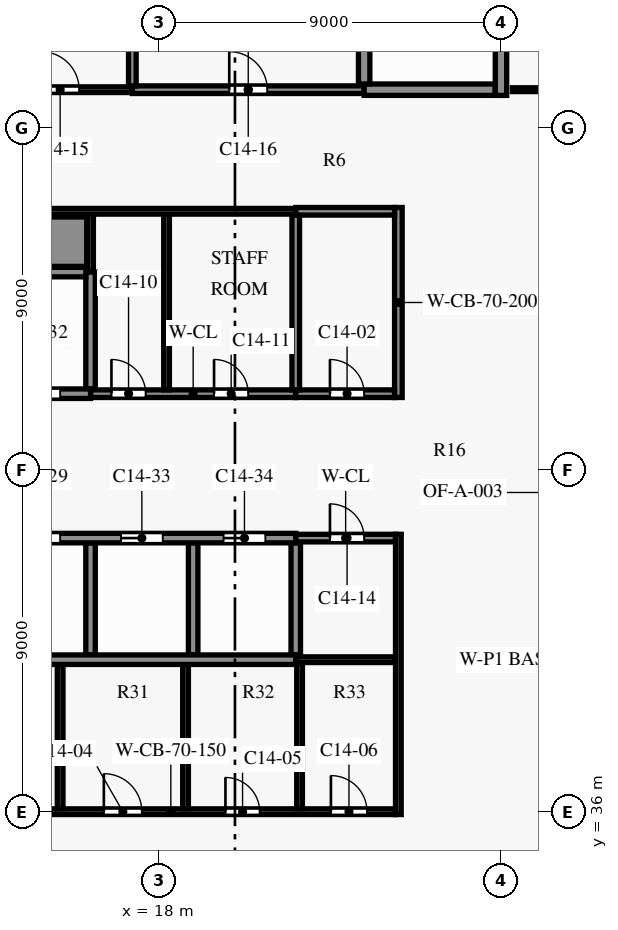
"""IFC4 building model, lengths in metres.
Left out: names, types, materials, properties, quantities, classifications, styles, units other than length and angle.
Written with IfcOpenShell. Run it as: python <this file> out.ifc"""

import sys

from ifc_helpers import new_model, si_unit, direction, frame, frame_2d, origin, place, context, subcontext, project, spatial, rectangle, extrude, element, fill, save


model = new_model("IFC4")
c1 = context("Model", 3, precision=1e-05, world=origin(), true_north=direction((0.0, 1.0)))
c2 = subcontext(c1, "Body", "Model", "MODEL_VIEW")
j1 = project(units=[si_unit("LENGTHUNIT", "METRE"), si_unit("PLANEANGLEUNIT", "RADIAN")], contexts=[c1])
p1 = place(None, origin())
s1 = spatial("IfcSite", under=j1, at=p1, CompositionType="ELEMENT")
p2 = place(p1, origin())
s2 = spatial("IfcBuilding", under=s1, at=p2, CompositionType="ELEMENT")
p3 = place(p2, frame((0.0, 0.0, 88.5)))
s3 = spatial("IfcBuildingStorey", under=s2, at=p3, CompositionType="ELEMENT", Elevation=88.5)
p4 = place(p3, frame((12.4, 36.0, 0.0), z_axis=(0.0, 0.0, 1.0), x_axis=(1.0, 0.0, 0.0)))
e1 = element("IfcWall", 1, at=p4, inside=s3, PredefinedType="SHEAR", context=c2, shape_type="SweptSolid", body=[
    extrude(rectangle(XDim=11.825, YDim=0.15, at=frame_2d((5.913, 0.0))), origin(), (0.0, 0.0, 1.0), 3.5),
])
p5 = place(p4, frame((1.05, 0.0, 0.0)))
e2 = element("IfcOpeningElement", 2, at=p5, cuts=e1, PredefinedType="OPENING", context=c2, shape_type="SweptSolid", body=[
    extrude(rectangle(XDim=0.9, YDim=2.1, at=frame_2d((0.45, 1.05))), frame((0.0, 0.085, 0.0), z_axis=(0.0, -1.0, 0.0), x_axis=(1.0, 0.0, 0.0)), (0.0, 0.0, 1.0), 0.17),
])
p6 = place(p4, frame((4.15, 0.0, 0.0)))
e3 = element("IfcOpeningElement", 3, at=p6, cuts=e1, PredefinedType="OPENING", context=c2, shape_type="SweptSolid", body=[
    extrude(rectangle(XDim=1.0, YDim=2.1, at=frame_2d((0.5, 1.05))), frame((0.0, 0.085, 0.0), z_axis=(0.0, -1.0, 0.0), x_axis=(1.0, 0.0, 0.0)), (0.0, 0.0, 1.0), 0.17),
])
p7 = place(p4, frame((7.35, 0.0, 0.0)))
e4 = element("IfcOpeningElement", 4, at=p7, cuts=e1, PredefinedType="OPENING", context=c2, shape_type="SweptSolid", body=[
    extrude(rectangle(XDim=0.9, YDim=2.1, at=frame_2d((0.45, 1.05))), frame((0.0, 0.085, 0.0), z_axis=(0.0, -1.0, 0.0), x_axis=(1.0, 0.0, 0.0)), (0.0, 0.0, 1.0), 0.17),
])
p8 = place(p4, frame((10.125, 0.0, 0.0)))
e5 = element("IfcOpeningElement", 5, at=p8, cuts=e1, PredefinedType="OPENING", context=c2, shape_type="SweptSolid", body=[
    extrude(rectangle(XDim=0.95, YDim=2.1, at=frame_2d((0.475, 1.05))), frame((0.0, 0.085, 0.0), z_axis=(0.0, -1.0, 0.0), x_axis=(1.0, 0.0, 0.0)), (0.0, 0.0, 1.0), 0.17),
])
p9 = place(p3, frame((21.6, 40.0, 0.0), z_axis=(0.0, 0.0, 1.0), x_axis=(1.0, 0.0, 0.0)))
e6 = element("IfcWall", 6, at=p9, inside=s3, PredefinedType="PARTITIONING", context=c2, shape_type="SweptSolid", body=[
    extrude(rectangle(XDim=2.625, YDim=0.15, at=frame_2d((1.312, 0.0))), origin(), (0.0, 0.0, 1.0), 3.5),
])
p10 = place(p3, frame((8.1, 40.0, 0.0), z_axis=(0.0, 0.0, 1.0), x_axis=(1.0, 0.0, 0.0)))
e7 = element("IfcWall", 7, at=p10, inside=s3, PredefinedType="SHEAR", context=c2, shape_type="SweptSolid", body=[
    extrude(rectangle(XDim=13.5, YDim=0.25, at=frame_2d((6.75, 0.0))), origin(), (0.0, 0.0, 1.0), 3.5),
])
p11 = place(p3, frame((21.6, 43.2, 0.0), z_axis=(0.0, 0.0, 1.0), x_axis=(1.0, 0.0, 0.0)))
e8 = element("IfcWall", 8, at=p11, inside=s3, PredefinedType="PARTITIONING", context=c2, shape_type="SweptSolid", body=[
    extrude(rectangle(XDim=2.625, YDim=0.2, at=frame_2d((1.312, 0.0))), origin(), (0.0, 0.0, 1.0), 3.5),
])
p12 = place(p11, frame((0.9, 0.0, 0.0)))
e9 = element("IfcOpeningElement", 9, at=p12, cuts=e8, PredefinedType="OPENING", context=c2, shape_type="SweptSolid", body=[
    extrude(rectangle(XDim=0.9, YDim=2.1, at=frame_2d((0.45, 1.05))), frame((0.0, 0.11, 0.0), z_axis=(0.0, -1.0, 0.0), x_axis=(1.0, 0.0, 0.0)), (0.0, 0.0, 1.0), 0.22),
])
p13 = place(p3, frame((8.1, 43.2, 0.0), z_axis=(0.0, 0.0, 1.0), x_axis=(1.0, 0.0, 0.0)))
e10 = element("IfcWall", 10, at=p13, inside=s3, PredefinedType="SHEAR", context=c2, shape_type="SweptSolid", body=[
    extrude(rectangle(XDim=13.5, YDim=0.25, at=frame_2d((6.75, 0.0))), origin(), (0.0, 0.0, 1.0), 3.5),
])
p14 = place(p13, frame((0.8, 0.0, 0.0)))
e11 = element("IfcOpeningElement", 11, at=p14, cuts=e10, PredefinedType="OPENING", context=c2, shape_type="SweptSolid", body=[
    extrude(rectangle(XDim=1.1, YDim=2.1, at=frame_2d((0.55, 1.05))), frame((0.0, 0.135, 0.0), z_axis=(0.0, -1.0, 0.0), x_axis=(1.0, 0.0, 0.0)), (0.0, 0.0, 1.0), 0.27),
])
p15 = place(p13, frame((3.5, 0.0, 0.0)))
e12 = element("IfcOpeningElement", 12, at=p15, cuts=e10, PredefinedType="OPENING", context=c2, shape_type="SweptSolid", body=[
    extrude(rectangle(XDim=1.1, YDim=2.1, at=frame_2d((0.55, 1.05))), frame((0.0, 0.135, 0.0), z_axis=(0.0, -1.0, 0.0), x_axis=(1.0, 0.0, 0.0)), (0.0, 0.0, 1.0), 0.27),
])
p16 = place(p13, frame((6.2, 0.0, 0.0)))
e13 = element("IfcOpeningElement", 13, at=p16, cuts=e10, PredefinedType="OPENING", context=c2, shape_type="SweptSolid", body=[
    extrude(rectangle(XDim=1.1, YDim=2.1, at=frame_2d((0.55, 1.05))), frame((0.0, 0.135, 0.0), z_axis=(0.0, -1.0, 0.0), x_axis=(1.0, 0.0, 0.0)), (0.0, 0.0, 1.0), 0.27),
])
p17 = place(p13, frame((8.9, 0.0, 0.0)))
e14 = element("IfcOpeningElement", 14, at=p17, cuts=e10, PredefinedType="OPENING", context=c2, shape_type="SweptSolid", body=[
    extrude(rectangle(XDim=1.1, YDim=2.1, at=frame_2d((0.55, 1.05))), frame((0.0, 0.135, 0.0), z_axis=(0.0, -1.0, 0.0), x_axis=(1.0, 0.0, 0.0)), (0.0, 0.0, 1.0), 0.27),
])
p18 = place(p13, frame((11.6, 0.0, 0.0)))
e15 = element("IfcOpeningElement", 15, at=p18, cuts=e10, PredefinedType="OPENING", context=c2, shape_type="SweptSolid", body=[
    extrude(rectangle(XDim=1.1, YDim=2.1, at=frame_2d((0.55, 1.05))), frame((0.0, 0.135, 0.0), z_axis=(0.0, -1.0, 0.0), x_axis=(1.0, 0.0, 0.0)), (0.0, 0.0, 1.0), 0.27),
])
p19 = place(p3, frame((16.2, 47.0, 0.0), z_axis=(0.0, 0.0, 1.0), x_axis=(1.0, 0.0, 0.0)))
e16 = element("IfcWall", 16, at=p19, inside=s3, PredefinedType="PARTITIONING", context=c2, shape_type="SweptSolid", body=[
    extrude(rectangle(XDim=5.4, YDim=0.2, at=frame_2d((2.7, 0.0))), origin(), (0.0, 0.0, 1.0), 3.5),
])
p20 = place(p19, frame((0.55, 0.0, 0.0)))
e17 = element("IfcOpeningElement", 17, at=p20, cuts=e16, PredefinedType="OPENING", context=c2, shape_type="SweptSolid", body=[
    extrude(rectangle(XDim=0.9, YDim=2.1, at=frame_2d((0.45, 1.05))), frame((0.0, 0.11, 0.0), z_axis=(0.0, -1.0, 0.0), x_axis=(1.0, 0.0, 0.0)), (0.0, 0.0, 1.0), 0.22),
])
p21 = place(p19, frame((3.25, 0.0, 0.0)))
e18 = element("IfcOpeningElement", 18, at=p21, cuts=e16, PredefinedType="OPENING", context=c2, shape_type="SweptSolid", body=[
    extrude(rectangle(XDim=0.9, YDim=2.1, at=frame_2d((0.45, 1.05))), frame((0.0, 0.11, 0.0), z_axis=(0.0, -1.0, 0.0), x_axis=(1.0, 0.0, 0.0)), (0.0, 0.0, 1.0), 0.22),
])
p22 = place(p3, frame((21.6, 47.0, 0.0), z_axis=(0.0, 0.0, 1.0), x_axis=(1.0, 0.0, 0.0)))
e19 = element("IfcWall", 19, at=p22, inside=s3, PredefinedType="PARTITIONING", context=c2, shape_type="SweptSolid", body=[
    extrude(rectangle(XDim=2.6, YDim=0.2, at=frame_2d((1.3, 0.0))), origin(), (0.0, 0.0, 1.0), 3.5),
])
p23 = place(p22, frame((0.9, 0.0, 0.0)))
e20 = element("IfcOpeningElement", 20, at=p23, cuts=e19, PredefinedType="OPENING", context=c2, shape_type="SweptSolid", body=[
    extrude(rectangle(XDim=0.9, YDim=2.1, at=frame_2d((0.45, 1.05))), frame((0.0, 0.11, 0.0), z_axis=(0.0, -1.0, 0.0), x_axis=(1.0, 0.0, 0.0)), (0.0, 0.0, 1.0), 0.22),
])
p24 = place(p3, frame((8.1, 47.0, 0.0), z_axis=(0.0, 0.0, 1.0), x_axis=(1.0, 0.0, 0.0)))
e21 = element("IfcWall", 21, at=p24, inside=s3, PredefinedType="SHEAR", context=c2, shape_type="SweptSolid", body=[
    extrude(rectangle(XDim=8.1, YDim=0.25, at=frame_2d((4.05, 0.0))), origin(), (0.0, 0.0, 1.0), 3.5),
])
p25 = place(p24, frame((0.8, 0.0, 0.0)))
e22 = element("IfcOpeningElement", 22, at=p25, cuts=e21, PredefinedType="OPENING", context=c2, shape_type="SweptSolid", body=[
    extrude(rectangle(XDim=1.1, YDim=2.1, at=frame_2d((0.55, 1.05))), frame((0.0, 0.135, 0.0), z_axis=(0.0, -1.0, 0.0), x_axis=(1.0, 0.0, 0.0)), (0.0, 0.0, 1.0), 0.27),
])
p26 = place(p24, frame((3.5, 0.0, 0.0)))
e23 = element("IfcOpeningElement", 23, at=p26, cuts=e21, PredefinedType="OPENING", context=c2, shape_type="SweptSolid", body=[
    extrude(rectangle(XDim=1.1, YDim=2.1, at=frame_2d((0.55, 1.05))), frame((0.0, 0.135, 0.0), z_axis=(0.0, -1.0, 0.0), x_axis=(1.0, 0.0, 0.0)), (0.0, 0.0, 1.0), 0.27),
])
p27 = place(p24, frame((6.2, 0.0, 0.0)))
e24 = element("IfcOpeningElement", 24, at=p27, cuts=e21, PredefinedType="OPENING", context=c2, shape_type="SweptSolid", body=[
    extrude(rectangle(XDim=1.1, YDim=2.1, at=frame_2d((0.55, 1.05))), frame((0.0, 0.135, 0.0), z_axis=(0.0, -1.0, 0.0), x_axis=(1.0, 0.0, 0.0)), (0.0, 0.0, 1.0), 0.27),
])
p28 = place(p3, frame((8.1, 50.2, 0.0), z_axis=(0.0, 0.0, 1.0), x_axis=(1.0, 0.0, 0.0)))
e25 = element("IfcWall", 25, at=p28, inside=s3, PredefinedType="SHEAR", context=c2, shape_type="SweptSolid", body=[
    extrude(rectangle(XDim=7.975, YDim=0.25, at=frame_2d((3.987, 0.0))), origin(), (0.0, 0.0, 1.0), 3.5),
])
p29 = place(p3, frame((-0.125, 51.0, 0.0), z_axis=(0.0, 0.0, 1.0), x_axis=(1.0, 0.0, 0.0)))
e26 = element("IfcWall", 26, at=p29, inside=s3, PredefinedType="SHEAR", context=c2, shape_type="SweptSolid", body=[
    extrude(rectangle(XDim=16.225, YDim=1.3, at=frame_2d((8.113, 0.0))), origin(), (0.0, 0.0, 1.0), 3.5),
])
p30 = place(p3, frame((8.1, 51.8, 0.0), z_axis=(0.0, 0.0, 1.0), x_axis=(1.0, 0.0, 0.0)))
e27 = element("IfcWall", 27, at=p30, inside=s3, PredefinedType="PARTITIONING", context=c2, shape_type="SweptSolid", body=[
    extrude(rectangle(XDim=13.5, YDim=0.15, at=frame_2d((6.75, 0.0))), origin(), (0.0, 0.0, 1.0), 3.5),
])
p31 = place(p3, frame((21.6, 51.8, 0.0), z_axis=(0.0, 0.0, 1.0), x_axis=(1.0, 0.0, 0.0)))
e28 = element("IfcWall", 28, at=p31, inside=s3, PredefinedType="PARTITIONING", context=c2, shape_type="SweptSolid", body=[
    extrude(rectangle(XDim=2.6, YDim=0.2, at=frame_2d((1.3, 0.0))), origin(), (0.0, 0.0, 1.0), 3.5),
])
p32 = place(p3, frame((13.5, 55.0, 0.0), z_axis=(0.0, 0.0, 1.0), x_axis=(1.0, 0.0, 0.0)))
e29 = element("IfcWall", 29, at=p32, inside=s3, PredefinedType="PARTITIONING", context=c2, shape_type="SweptSolid", body=[
    extrude(rectangle(XDim=3.8, YDim=0.15, at=frame_2d((1.9, 0.0))), origin(), (0.0, 0.0, 1.0), 3.5),
])
p33 = place(p32, frame((1.4, 0.0, 0.0)))
e30 = element("IfcOpeningElement", 30, at=p33, cuts=e29, PredefinedType="OPENING", context=c2, shape_type="SweptSolid", body=[
    extrude(rectangle(XDim=1.0, YDim=2.1, at=frame_2d((0.5, 1.05))), frame((0.0, 0.085, 0.0), z_axis=(0.0, -1.0, 0.0), x_axis=(1.0, 0.0, 0.0)), (0.0, 0.0, 1.0), 0.17),
])
p34 = place(p3, frame((17.3, 55.0, 0.0), z_axis=(0.0, 0.0, 1.0), x_axis=(1.0, 0.0, 0.0)))
e31 = element("IfcWall", 31, at=p34, inside=s3, PredefinedType="PARTITIONING", context=c2, shape_type="SweptSolid", body=[
    extrude(rectangle(XDim=6.1, YDim=0.2, at=frame_2d((3.05, 0.0))), origin(), (0.0, 0.0, 1.0), 3.5),
])
p35 = place(p34, frame((2.55, 0.0, 0.0)))
e32 = element("IfcOpeningElement", 32, at=p35, cuts=e31, PredefinedType="OPENING", context=c2, shape_type="SweptSolid", body=[
    extrude(rectangle(XDim=1.0, YDim=2.1, at=frame_2d((0.5, 1.05))), frame((0.0, 0.11, 0.0), z_axis=(0.0, -1.0, 0.0), x_axis=(1.0, 0.0, 0.0)), (0.0, 0.0, 1.0), 0.22),
])
p36 = place(p3, frame((23.4, 55.0, 0.0), z_axis=(0.0, 0.0, 1.0), x_axis=(1.0, 0.0, 0.0)))
e33 = element("IfcWall", 33, at=p36, inside=s3, PredefinedType="SHEAR", context=c2, shape_type="SweptSolid", body=[
    extrude(rectangle(XDim=3.45, YDim=0.3, at=frame_2d((1.725, 0.0))), origin(), (0.0, 0.0, 1.0), 3.5),
])
p37 = place(p3, frame((15.4, 36.075, 0.0), z_axis=(0.0, 0.0, 1.0), x_axis=(0.0, 1.0, 0.0)))
e34 = element("IfcWall", 34, at=p37, inside=s3, PredefinedType="PARTITIONING", context=c2, shape_type="SweptSolid", body=[
    extrude(rectangle(XDim=3.8, YDim=0.15, at=frame_2d((1.9, 0.0))), origin(), (0.0, 0.0, 1.0), 3.5),
])
p38 = place(p3, frame((16.2, 50.2, 0.0), z_axis=(0.0, 0.0, 1.0), x_axis=(0.0, 1.0, 0.0)))
e35 = element("IfcWall", 35, at=p38, inside=s3, PredefinedType="PARTITIONING", context=c2, shape_type="SweptSolid", body=[
    extrude(rectangle(XDim=1.525, YDim=0.15, at=frame_2d((0.763, 0.0))), origin(), (0.0, 0.0, 1.0), 3.5),
])
p39 = place(p3, frame((16.2, 40.125, 0.0), z_axis=(0.0, 0.0, 1.0), x_axis=(0.0, 1.0, 0.0)))
e36 = element("IfcWall", 36, at=p39, inside=s3, PredefinedType="SHEAR", context=c2, shape_type="SweptSolid", body=[
    extrude(rectangle(XDim=2.95, YDim=0.25, at=frame_2d((1.475, 0.0))), origin(), (0.0, 0.0, 1.0), 3.5),
])
p40 = place(p3, frame((16.2, 47.125, 0.0), z_axis=(0.0, 0.0, 1.0), x_axis=(0.0, 1.0, 0.0)))
e37 = element("IfcWall", 37, at=p40, inside=s3, PredefinedType="SHEAR", context=c2, shape_type="SweptSolid", body=[
    extrude(rectangle(XDim=3.075, YDim=0.25, at=frame_2d((1.538, 0.0))), origin(), (0.0, 0.0, 1.0), 3.5),
])
p41 = place(p3, frame((17.3, 55.1, 0.0), z_axis=(0.0, 0.0, 1.0), x_axis=(0.0, 1.0, 0.0)))
e38 = element("IfcWall", 38, at=p41, inside=s3, PredefinedType="PARTITIONING", context=c2, shape_type="SweptSolid", body=[
    extrude(rectangle(XDim=7.05, YDim=0.2, at=frame_2d((3.525, 0.0))), origin(), (0.0, 0.0, 1.0), 3.5),
])
p42 = place(p3, frame((18.2, 47.1, 0.0), z_axis=(0.0, 0.0, 1.0), x_axis=(0.0, 1.0, 0.0)))
e39 = element("IfcWall", 39, at=p42, inside=s3, PredefinedType="PARTITIONING", context=c2, shape_type="SweptSolid", body=[
    extrude(rectangle(XDim=4.625, YDim=0.15, at=frame_2d((2.312, 0.0))), origin(), (0.0, 0.0, 1.0), 3.5),
])
p43 = place(p3, frame((18.7, 36.075, 0.0), z_axis=(0.0, 0.0, 1.0), x_axis=(0.0, 1.0, 0.0)))
e40 = element("IfcWall", 40, at=p43, inside=s3, PredefinedType="PARTITIONING", context=c2, shape_type="SweptSolid", body=[
    extrude(rectangle(XDim=3.8, YDim=0.15, at=frame_2d((1.9, 0.0))), origin(), (0.0, 0.0, 1.0), 3.5),
])
p44 = place(p3, frame((18.9, 40.125, 0.0), z_axis=(0.0, 0.0, 1.0), x_axis=(0.0, 1.0, 0.0)))
e41 = element("IfcWall", 41, at=p44, inside=s3, PredefinedType="SHEAR", context=c2, shape_type="SweptSolid", body=[
    extrude(rectangle(XDim=2.95, YDim=0.25, at=frame_2d((1.475, 0.0))), origin(), (0.0, 0.0, 1.0), 3.5),
])
p45 = place(p3, frame((21.6, 47.1, 0.0), z_axis=(0.0, 0.0, 1.0), x_axis=(0.0, 1.0, 0.0)))
e42 = element("IfcWall", 42, at=p45, inside=s3, PredefinedType="PARTITIONING", context=c2, shape_type="SweptSolid", body=[
    extrude(rectangle(XDim=4.6, YDim=0.2, at=frame_2d((2.3, 0.0))), origin(), (0.0, 0.0, 1.0), 3.5),
])
p46 = place(p3, frame((21.6, 40.125, 0.0), z_axis=(0.0, 0.0, 1.0), x_axis=(0.0, 1.0, 0.0)))
e43 = element("IfcWall", 43, at=p46, inside=s3, PredefinedType="SHEAR", context=c2, shape_type="SweptSolid", body=[
    extrude(rectangle(XDim=2.95, YDim=0.25, at=frame_2d((1.475, 0.0))), origin(), (0.0, 0.0, 1.0), 3.5),
])
p47 = place(p3, frame((21.7, 36.075, 0.0), z_axis=(0.0, 0.0, 1.0), x_axis=(0.0, 1.0, 0.0)))
e44 = element("IfcWall", 44, at=p47, inside=s3, PredefinedType="PARTITIONING", context=c2, shape_type="SweptSolid", body=[
    extrude(rectangle(XDim=3.85, YDim=0.15, at=frame_2d((1.925, 0.0))), origin(), (0.0, 0.0, 1.0), 3.5),
])
p48 = place(p3, frame((23.4, 55.15, 0.0), z_axis=(0.0, 0.0, 1.0), x_axis=(0.0, 1.0, 0.0)))
e45 = element("IfcWall", 45, at=p48, inside=s3, PredefinedType="SHEAR", context=c2, shape_type="SweptSolid", body=[
    extrude(rectangle(XDim=8.0, YDim=0.3, at=frame_2d((4.0, 0.0))), origin(), (0.0, 0.0, 1.0), 3.5),
])
p49 = place(p3, frame((24.3, 35.925, 0.0), z_axis=(0.0, 0.0, 1.0), x_axis=(0.0, 1.0, 0.0)))
e46 = element("IfcWall", 46, at=p49, inside=s3, PredefinedType="PARTITIONING", context=c2, shape_type="SweptSolid", body=[
    extrude(rectangle(XDim=7.375, YDim=0.15, at=frame_2d((3.688, 0.0))), origin(), (0.0, 0.0, 1.0), 3.5),
])
p50 = place(p3, frame((24.3, 46.9, 0.0), z_axis=(0.0, 0.0, 1.0), x_axis=(0.0, 1.0, 0.0)))
e47 = element("IfcWall", 47, at=p50, inside=s3, PredefinedType="SHEAR", context=c2, shape_type="SweptSolid", body=[
    extrude(rectangle(XDim=5.0, YDim=0.2, at=frame_2d((2.5, 0.0))), origin(), (0.0, 0.0, 1.0), 3.5),
])
p51 = place(p3, frame((27.0, 54.85, 0.0), z_axis=(0.0, 0.0, 1.0), x_axis=(0.0, 1.0, 0.0)))
e48 = element("IfcWall", 48, at=p51, inside=s3, PredefinedType="SHEAR", context=c2, shape_type="SweptSolid", body=[
    extrude(rectangle(XDim=8.45, YDim=0.3, at=frame_2d((4.225, 0.0))), origin(), (0.0, 0.0, 1.0), 3.5),
])
p52 = place(p51, frame((6.55, 0.0, 0.0)))
e49 = element("IfcOpeningElement", 49, at=p52, cuts=e48, PredefinedType="OPENING", context=c2, shape_type="SweptSolid", body=[
    extrude(rectangle(XDim=1.2, YDim=2.2, at=frame_2d((0.6, 1.1))), frame((0.0, 0.16, 0.0), z_axis=(0.0, -1.0, 0.0), x_axis=(1.0, 0.0, 0.0)), (0.0, 0.0, 1.0), 0.32),
])
p53 = place(p3, frame((27.3, 55.0, 0.0), z_axis=(0.0, 0.0, 1.0), x_axis=(1.0, 0.0, 0.0)))
e50 = element("IfcWall", 50, at=p53, inside=s3, PredefinedType="PARTITIONING", context=c2, shape_type="SweptSolid", body=[
    extrude(rectangle(XDim=3.25, YDim=0.1, at=frame_2d((1.625, 0.0))), origin(), (0.0, 0.0, 1.0), 3.48),
])
p54 = place(p23, origin())
e51 = element("IfcDoor", 51, at=p54, inside=s3, OperationType="SINGLE_SWING_LEFT", PredefinedType="DOOR", context=c2, shape_type="SweptSolid", body=[
    extrude(rectangle(XDim=0.9, YDim=2.1, at=frame_2d((0.45, 1.05))), frame((0.0, 0.025, 0.0), z_axis=(0.0, -1.0, 0.0), x_axis=(1.0, 0.0, 0.0)), (0.0, 0.0, 1.0), 0.05),
])
fill(e20, e51)
p55 = place(p6, origin())
e52 = element("IfcDoor", 52, at=p55, inside=s3, OperationType="SINGLE_SWING_LEFT", PredefinedType="DOOR", context=c2, shape_type="SweptSolid", body=[
    extrude(rectangle(XDim=1.0, YDim=2.1, at=frame_2d((0.5, 1.05))), frame((0.0, 0.025, 0.0), z_axis=(0.0, -1.0, 0.0), x_axis=(1.0, 0.0, 0.0)), (0.0, 0.0, 1.0), 0.05),
])
fill(e3, e52)
p56 = place(p7, origin())
e53 = element("IfcDoor", 53, at=p56, inside=s3, OperationType="SINGLE_SWING_RIGHT", PredefinedType="DOOR", context=c2, shape_type="SweptSolid", body=[
    extrude(rectangle(XDim=0.9, YDim=2.1, at=frame_2d((0.45, 1.05))), frame((0.0, 0.025, 0.0), z_axis=(0.0, -1.0, 0.0), x_axis=(1.0, 0.0, 0.0)), (0.0, 0.0, 1.0), 0.05),
])
fill(e4, e53)
p57 = place(p8, origin())
e54 = element("IfcDoor", 54, at=p57, inside=s3, OperationType="SINGLE_SWING_LEFT", PredefinedType="DOOR", context=c2, shape_type="SweptSolid", body=[
    extrude(rectangle(XDim=0.95, YDim=2.1, at=frame_2d((0.475, 1.05))), frame((0.0, 0.025, 0.0), z_axis=(0.0, -1.0, 0.0), x_axis=(1.0, 0.0, 0.0)), (0.0, 0.0, 1.0), 0.05),
])
fill(e5, e54)
p58 = place(p20, origin())
e55 = element("IfcDoor", 55, at=p58, inside=s3, OperationType="SINGLE_SWING_LEFT", PredefinedType="DOOR", context=c2, shape_type="SweptSolid", body=[
    extrude(rectangle(XDim=0.9, YDim=2.1, at=frame_2d((0.45, 1.05))), frame((0.0, 0.025, 0.0), z_axis=(0.0, -1.0, 0.0), x_axis=(1.0, 0.0, 0.0)), (0.0, 0.0, 1.0), 0.05),
])
fill(e17, e55)
p59 = place(p21, origin())
e56 = element("IfcDoor", 56, at=p59, inside=s3, OperationType="SINGLE_SWING_RIGHT", PredefinedType="DOOR", context=c2, shape_type="SweptSolid", body=[
    extrude(rectangle(XDim=0.9, YDim=2.1, at=frame_2d((0.45, 1.05))), frame((0.0, 0.025, 0.0), z_axis=(0.0, -1.0, 0.0), x_axis=(1.0, 0.0, 0.0)), (0.0, 0.0, 1.0), 0.05),
])
fill(e18, e56)
p60 = place(p12, origin())
e57 = element("IfcDoor", 57, at=p60, inside=s3, OperationType="SINGLE_SWING_RIGHT", PredefinedType="DOOR", context=c2, shape_type="SweptSolid", body=[
    extrude(rectangle(XDim=0.9, YDim=2.1, at=frame_2d((0.45, 1.05))), frame((0.0, 0.025, 0.0), z_axis=(0.0, -1.0, 0.0), x_axis=(1.0, 0.0, 0.0)), (0.0, 0.0, 1.0), 0.05),
])
fill(e9, e57)
p61 = place(p33, origin())
e58 = element("IfcDoor", 58, at=p61, inside=s3, OperationType="SINGLE_SWING_LEFT", PredefinedType="DOOR", context=c2, shape_type="SweptSolid", body=[
    extrude(rectangle(XDim=1.0, YDim=2.1, at=frame_2d((0.5, 1.05))), frame((0.0, 0.025, 0.0), z_axis=(0.0, -1.0, 0.0), x_axis=(1.0, 0.0, 0.0)), (0.0, 0.0, 1.0), 0.05),
])
fill(e30, e58)
p62 = place(p35, origin())
e59 = element("IfcDoor", 59, at=p62, inside=s3, OperationType="SINGLE_SWING_RIGHT", PredefinedType="DOOR", context=c2, shape_type="SweptSolid", body=[
    extrude(rectangle(XDim=1.0, YDim=2.1, at=frame_2d((0.5, 1.05))), frame((0.0, 0.025, 0.0), z_axis=(0.0, -1.0, 0.0), x_axis=(1.0, 0.0, 0.0)), (0.0, 0.0, 1.0), 0.05),
])
fill(e32, e59)
p63 = place(p16, origin())
e60 = element("IfcDoor", 60, at=p63, inside=s3, OperationType="DOUBLE_DOOR_SLIDING", PredefinedType="DOOR", context=c2, shape_type="SweptSolid", body=[
    extrude(rectangle(XDim=1.1, YDim=2.1, at=frame_2d((0.55, 1.05))), frame((0.0, 0.025, 0.0), z_axis=(0.0, -1.0, 0.0), x_axis=(1.0, 0.0, 0.0)), (0.0, 0.0, 1.0), 0.05),
])
fill(e13, e60)
p64 = place(p27, origin())
e61 = element("IfcDoor", 61, at=p64, inside=s3, OperationType="DOUBLE_DOOR_SLIDING", PredefinedType="DOOR", context=c2, shape_type="SweptSolid", body=[
    extrude(rectangle(XDim=1.1, YDim=2.1, at=frame_2d((0.55, 1.05))), frame((0.0, 0.025, 0.0), z_axis=(0.0, -1.0, 0.0), x_axis=(1.0, 0.0, 0.0)), (0.0, 0.0, 1.0), 0.05),
])
fill(e24, e61)
p65 = place(p17, origin())
e62 = element("IfcDoor", 62, at=p65, inside=s3, OperationType="DOUBLE_DOOR_SLIDING", PredefinedType="DOOR", context=c2, shape_type="SweptSolid", body=[
    extrude(rectangle(XDim=1.1, YDim=2.1, at=frame_2d((0.55, 1.05))), frame((0.0, 0.025, 0.0), z_axis=(0.0, -1.0, 0.0), x_axis=(1.0, 0.0, 0.0)), (0.0, 0.0, 1.0), 0.05),
])
fill(e14, e62)
p66 = place(p18, origin())
e63 = element("IfcDoor", 63, at=p66, inside=s3, OperationType="DOUBLE_DOOR_SLIDING", PredefinedType="DOOR", context=c2, shape_type="SweptSolid", body=[
    extrude(rectangle(XDim=1.1, YDim=2.1, at=frame_2d((0.55, 1.05))), frame((0.0, 0.025, 0.0), z_axis=(0.0, -1.0, 0.0), x_axis=(1.0, 0.0, 0.0)), (0.0, 0.0, 1.0), 0.05),
])
fill(e15, e63)
save(model, sys.argv[1])
